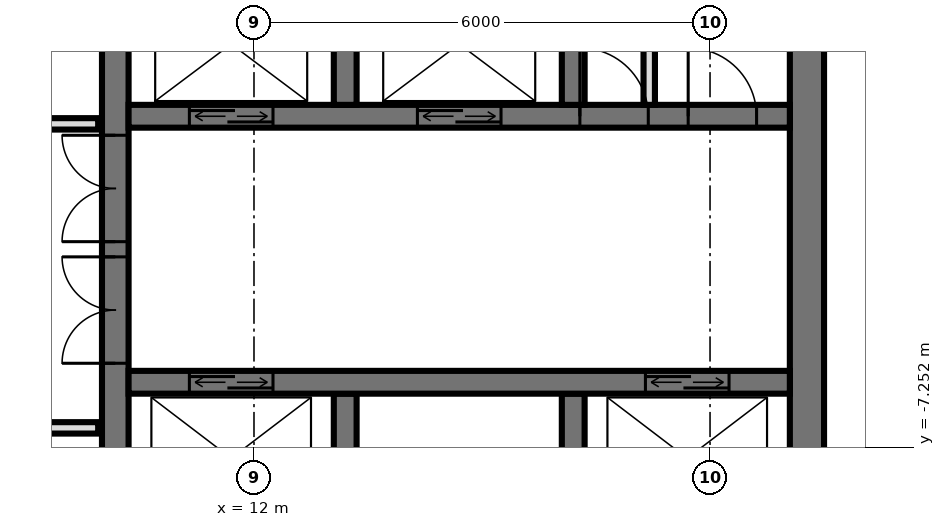
"""IFC4 building model, lengths in metres.
Left out: names, types, materials, properties, quantities, classifications, styles, units other than length and angle.
Written with IfcOpenShell. Run it as: python <this file> out.ifc"""

import sys

from ifc_helpers import new_model, si_unit, direction, frame, frame_2d, origin, place, context, subcontext, project, spatial, rectangle, extrude, element, fill, save


model = new_model("IFC4")
c1 = context("Model", 3, precision=1e-05, world=origin(), true_north=direction((0.0, 1.0)))
c2 = subcontext(c1, "Body", "Model", "MODEL_VIEW")
j1 = project(units=[si_unit("LENGTHUNIT", "METRE"), si_unit("PLANEANGLEUNIT", "RADIAN")], contexts=[c1])
p1 = place(None, origin())
s1 = spatial("IfcSite", under=j1, at=p1, CompositionType="ELEMENT")
p2 = place(p1, origin())
s2 = spatial("IfcBuilding", under=s1, at=p2, CompositionType="ELEMENT")
p3 = place(p2, frame((0.0, 0.0, 342.6)))
s3 = spatial("IfcBuildingStorey", under=s2, at=p3, CompositionType="ELEMENT", Elevation=342.6)
p4 = place(p3, frame((10.175, -14.55, 0.0), z_axis=(0.0, 0.0, 1.0), x_axis=(0.0, 1.0, 0.0)))
e1 = element("IfcWall", 1, at=p4, inside=s3, PredefinedType="SHEAR", context=c2, shape_type="SweptSolid", body=[
    extrude(rectangle(XDim=14.1, YDim=0.35, at=frame_2d((7.05, 0.0))), origin(), (0.0, 0.0, 1.0), 4.0),
])
p5 = place(p4, frame((8.4, 0.0, 0.0)))
e2 = element("IfcOpeningElement", 2, at=p5, cuts=e1, PredefinedType="OPENING", context=c2, shape_type="SweptSolid", body=[
    extrude(rectangle(XDim=1.4, YDim=2.4, at=frame_2d((0.7, 1.2))), frame((0.0, 0.185, 0.0), z_axis=(0.0, -1.0, 0.0), x_axis=(1.0, 0.0, 0.0)), (0.0, 0.0, 1.0), 0.37),
])
p6 = place(p4, frame((10.0, 0.0, 0.0)))
e3 = element("IfcOpeningElement", 3, at=p6, cuts=e1, PredefinedType="OPENING", context=c2, shape_type="SweptSolid", body=[
    extrude(rectangle(XDim=1.4, YDim=2.4, at=frame_2d((0.7, 1.2))), frame((0.0, 0.185, 0.0), z_axis=(0.0, -1.0, 0.0), x_axis=(1.0, 0.0, 0.0)), (0.0, 0.0, 1.0), 0.37),
])
p7 = place(p4, frame((4.0, 0.0, 0.0)))
e4 = element("IfcOpeningElement", 4, at=p7, cuts=e1, PredefinedType="OPENING", context=c2, shape_type="SweptSolid", body=[
    extrude(rectangle(XDim=1.2, YDim=2.1, at=frame_2d((0.6, 1.05))), frame((0.0, 0.185, 0.0), z_axis=(0.0, -1.0, 0.0), x_axis=(1.0, 0.0, 0.0)), (0.0, 0.0, 1.0), 0.37),
])
p8 = place(p3, frame((19.275, -14.55, 0.0), z_axis=(0.0, 0.0, 1.0), x_axis=(0.0, 1.0, 0.0)))
e5 = element("IfcWall", 5, at=p8, inside=s3, PredefinedType="SHEAR", context=c2, shape_type="SweptSolid", body=[
    extrude(rectangle(XDim=14.1, YDim=0.45, at=frame_2d((7.05, 0.0))), origin(), (0.0, 0.0, 1.0), 4.0),
])
p9 = place(p3, frame((10.35, -2.9, 0.0), z_axis=(0.0, 0.0, 1.0), x_axis=(1.0, 0.0, 0.0)))
e6 = element("IfcWall", 6, at=p9, inside=s3, PredefinedType="SHEAR", context=c2, shape_type="SweptSolid", body=[
    extrude(rectangle(XDim=8.7, YDim=0.3, at=frame_2d((4.35, 0.0))), origin(), (0.0, 0.0, 1.0), 4.0),
])
p10 = place(p9, frame((0.8, 0.0, 0.0)))
e7 = element("IfcOpeningElement", 7, at=p10, cuts=e6, PredefinedType="OPENING", context=c2, shape_type="SweptSolid", body=[
    extrude(rectangle(XDim=1.1, YDim=2.1, at=frame_2d((0.55, 1.05))), frame((0.0, 0.16, 0.0), z_axis=(0.0, -1.0, 0.0), x_axis=(1.0, 0.0, 0.0)), (0.0, 0.0, 1.0), 0.32),
])
p11 = place(p9, frame((3.8, 0.0, 0.0)))
e8 = element("IfcOpeningElement", 8, at=p11, cuts=e6, PredefinedType="OPENING", context=c2, shape_type="SweptSolid", body=[
    extrude(rectangle(XDim=1.1, YDim=2.1, at=frame_2d((0.55, 1.05))), frame((0.0, 0.16, 0.0), z_axis=(0.0, -1.0, 0.0), x_axis=(1.0, 0.0, 0.0)), (0.0, 0.0, 1.0), 0.32),
])
p12 = place(p9, frame((5.938, 0.0, 0.0)))
e9 = element("IfcOpeningElement", 9, at=p12, cuts=e6, PredefinedType="OPENING", context=c2, shape_type="SweptSolid", body=[
    extrude(rectangle(XDim=0.9, YDim=2.1, at=frame_2d((0.45, 1.05))), frame((0.0, 0.16, 0.0), z_axis=(0.0, -1.0, 0.0), x_axis=(1.0, 0.0, 0.0)), (0.0, 0.0, 1.0), 0.32),
])
p13 = place(p9, frame((7.363, 0.0, 0.0)))
e10 = element("IfcOpeningElement", 10, at=p13, cuts=e6, PredefinedType="OPENING", context=c2, shape_type="SweptSolid", body=[
    extrude(rectangle(XDim=0.9, YDim=2.1, at=frame_2d((0.45, 1.05))), frame((0.0, 0.16, 0.0), z_axis=(0.0, -1.0, 0.0), x_axis=(1.0, 0.0, 0.0)), (0.0, 0.0, 1.0), 0.32),
])
p14 = place(p3, frame((10.35, -6.4, 0.0), z_axis=(0.0, 0.0, 1.0), x_axis=(1.0, 0.0, 0.0)))
e11 = element("IfcWall", 11, at=p14, inside=s3, PredefinedType="SHEAR", context=c2, shape_type="SweptSolid", body=[
    extrude(rectangle(XDim=8.7, YDim=0.3, at=frame_2d((4.35, 0.0))), origin(), (0.0, 0.0, 1.0), 4.0),
])
p15 = place(p14, frame((0.8, 0.0, 0.0)))
e12 = element("IfcOpeningElement", 12, at=p15, cuts=e11, PredefinedType="OPENING", context=c2, shape_type="SweptSolid", body=[
    extrude(rectangle(XDim=1.1, YDim=2.1, at=frame_2d((0.55, 1.05))), frame((0.0, 0.16, 0.0), z_axis=(0.0, -1.0, 0.0), x_axis=(1.0, 0.0, 0.0)), (0.0, 0.0, 1.0), 0.32),
])
p16 = place(p14, frame((6.8, 0.0, 0.0)))
e13 = element("IfcOpeningElement", 13, at=p16, cuts=e11, PredefinedType="OPENING", context=c2, shape_type="SweptSolid", body=[
    extrude(rectangle(XDim=1.1, YDim=2.1, at=frame_2d((0.55, 1.05))), frame((0.0, 0.16, 0.0), z_axis=(0.0, -1.0, 0.0), x_axis=(1.0, 0.0, 0.0)), (0.0, 0.0, 1.0), 0.32),
])
for number, where, z_axis, x_axis in (
    (14, (13.2, -2.75, 0.0), (0.0, 0.0, 1.0), (0.0, 1.0, 0.0)),
    (15, (13.2, -8.85, 0.0), (0.0, 0.0, 1.0), (0.0, 1.0, 0.0)),
    (16, (16.2, -2.75, 0.0), (0.0, 0.0, 1.0), (0.0, 1.0, 0.0)),
    (17, (16.2, -8.85, 0.0), (0.0, 0.0, 1.0), (0.0, 1.0, 0.0)),
):
    element("IfcWall", number, at=place(p3, frame(where, z_axis=z_axis, x_axis=x_axis)), inside=s3, PredefinedType="SHEAR", context=c2, shape_type="SweptSolid", body=[
        extrude(rectangle(XDim=2.3, YDim=0.3, at=frame_2d((1.15, 0.0))), origin(), (0.0, 0.0, 1.0), 4.0),
    ])
p17 = place(p3, frame((17.2, -2.75, 0.0), z_axis=(0.0, 0.0, 1.0), x_axis=(0.0, 1.0, 0.0)))
e18 = element("IfcWall", 18, at=p17, inside=s3, PredefinedType="PARTITIONING", context=c2, shape_type="SweptSolid", body=[
    extrude(rectangle(XDim=2.3, YDim=0.15, at=frame_2d((1.15, 0.0))), origin(), (0.0, 0.0, 1.0), 3.7),
])
p18 = place(p3, frame((-9.95, -7.0, 0.0), z_axis=(0.0, 0.0, 1.0), x_axis=(1.0, 0.0, 0.0)))
e19 = element("IfcWall", 19, at=p18, inside=s3, PredefinedType="PARTITIONING", context=c2, shape_type="SweptSolid", body=[
    extrude(rectangle(XDim=19.9, YDim=0.15, at=frame_2d((9.95, 0.0))), origin(), (0.0, 0.0, 1.0), 3.72),
])
p19 = place(p18, frame((9.45, 0.0, 0.0)))
e20 = element("IfcOpeningElement", 20, at=p19, cuts=e19, PredefinedType="OPENING", context=c2, shape_type="SweptSolid", body=[
    extrude(rectangle(XDim=1.0, YDim=2.1, at=frame_2d((0.5, 1.05))), frame((0.0, 0.085, 0.0), z_axis=(0.0, -1.0, 0.0), x_axis=(1.0, 0.0, 0.0)), (0.0, 0.0, 1.0), 0.17),
])
p20 = place(p18, frame((3.45, 0.0, 0.0)))
e21 = element("IfcOpeningElement", 21, at=p20, cuts=e19, PredefinedType="OPENING", context=c2, shape_type="SweptSolid", body=[
    extrude(rectangle(XDim=1.0, YDim=2.1, at=frame_2d((0.5, 1.05))), frame((0.0, 0.085, 0.0), z_axis=(0.0, -1.0, 0.0), x_axis=(1.0, 0.0, 0.0)), (0.0, 0.0, 1.0), 0.17),
])
p21 = place(p3, frame((-9.95, -3.0, 0.0), z_axis=(0.0, 0.0, 1.0), x_axis=(1.0, 0.0, 0.0)))
e22 = element("IfcWall", 22, at=p21, inside=s3, PredefinedType="PARTITIONING", context=c2, shape_type="SweptSolid", body=[
    extrude(rectangle(XDim=19.9, YDim=0.15, at=frame_2d((9.95, 0.0))), origin(), (0.0, 0.0, 1.0), 3.72),
])
p22 = place(p21, frame((0.95, 0.0, 0.0)))
e23 = element("IfcOpeningElement", 23, at=p22, cuts=e22, PredefinedType="OPENING", context=c2, shape_type="SweptSolid", body=[
    extrude(rectangle(XDim=1.0, YDim=2.1, at=frame_2d((0.5, 1.05))), frame((0.0, 0.085, 0.0), z_axis=(0.0, -1.0, 0.0), x_axis=(1.0, 0.0, 0.0)), (0.0, 0.0, 1.0), 0.17),
])
p23 = place(p21, frame((3.7, 0.0, 0.0)))
e24 = element("IfcOpeningElement", 24, at=p23, cuts=e22, PredefinedType="OPENING", context=c2, shape_type="SweptSolid", body=[
    extrude(rectangle(XDim=1.0, YDim=2.1, at=frame_2d((0.5, 1.05))), frame((0.0, 0.085, 0.0), z_axis=(0.0, -1.0, 0.0), x_axis=(1.0, 0.0, 0.0)), (0.0, 0.0, 1.0), 0.17),
])
p24 = place(p21, frame((8.95, 0.0, 0.0)))
e25 = element("IfcOpeningElement", 25, at=p24, cuts=e22, PredefinedType="OPENING", context=c2, shape_type="SweptSolid", body=[
    extrude(rectangle(XDim=1.0, YDim=2.1, at=frame_2d((0.5, 1.05))), frame((0.0, 0.085, 0.0), z_axis=(0.0, -1.0, 0.0), x_axis=(1.0, 0.0, 0.0)), (0.0, 0.0, 1.0), 0.17),
])
p25 = place(p21, frame((16.2, 0.0, 0.0)))
e26 = element("IfcOpeningElement", 26, at=p25, cuts=e22, PredefinedType="OPENING", context=c2, shape_type="SweptSolid", body=[
    extrude(rectangle(XDim=1.0, YDim=2.1, at=frame_2d((0.5, 1.05))), frame((0.0, 0.085, 0.0), z_axis=(0.0, -1.0, 0.0), x_axis=(1.0, 0.0, 0.0)), (0.0, 0.0, 1.0), 0.17),
])
p26 = place(p10, origin())
e27 = element("IfcDoor", 27, at=p26, inside=s3, OperationType="DOUBLE_DOOR_SLIDING", PredefinedType="USERDEFINED", context=c2, shape_type="SweptSolid", body=[
    extrude(rectangle(XDim=1.1, YDim=2.1, at=frame_2d((0.55, 1.05))), frame((0.0, 0.025, 0.0), z_axis=(0.0, -1.0, 0.0), x_axis=(1.0, 0.0, 0.0)), (0.0, 0.0, 1.0), 0.05),
])
fill(e7, e27)
p27 = place(p11, origin())
e28 = element("IfcDoor", 28, at=p27, inside=s3, OperationType="DOUBLE_DOOR_SLIDING", PredefinedType="USERDEFINED", context=c2, shape_type="SweptSolid", body=[
    extrude(rectangle(XDim=1.1, YDim=2.1, at=frame_2d((0.55, 1.05))), frame((0.0, 0.025, 0.0), z_axis=(0.0, -1.0, 0.0), x_axis=(1.0, 0.0, 0.0)), (0.0, 0.0, 1.0), 0.05),
])
fill(e8, e28)
p28 = place(p15, origin())
e29 = element("IfcDoor", 29, at=p28, inside=s3, OperationType="DOUBLE_DOOR_SLIDING", PredefinedType="USERDEFINED", context=c2, shape_type="SweptSolid", body=[
    extrude(rectangle(XDim=1.1, YDim=2.1, at=frame_2d((0.55, 1.05))), frame((0.0, 0.025, 0.0), z_axis=(0.0, -1.0, 0.0), x_axis=(1.0, 0.0, 0.0)), (0.0, 0.0, 1.0), 0.05),
])
fill(e12, e29)
p29 = place(p16, origin())
e30 = element("IfcDoor", 30, at=p29, inside=s3, OperationType="DOUBLE_DOOR_SLIDING", PredefinedType="USERDEFINED", context=c2, shape_type="SweptSolid", body=[
    extrude(rectangle(XDim=1.1, YDim=2.1, at=frame_2d((0.55, 1.05))), frame((0.0, 0.025, 0.0), z_axis=(0.0, -1.0, 0.0), x_axis=(1.0, 0.0, 0.0)), (0.0, 0.0, 1.0), 0.05),
])
fill(e13, e30)
p30 = place(p5, origin())
e31 = element("IfcDoor", 31, at=p30, inside=s3, OperationType="DOUBLE_DOOR_SINGLE_SWING", PredefinedType="DOOR", context=c2, shape_type="SweptSolid", body=[
    extrude(rectangle(XDim=1.4, YDim=2.4, at=frame_2d((0.7, 1.2))), frame((0.0, 0.025, 0.0), z_axis=(0.0, -1.0, 0.0), x_axis=(1.0, 0.0, 0.0)), (0.0, 0.0, 1.0), 0.05),
])
fill(e2, e31)
p31 = place(p6, origin())
e32 = element("IfcDoor", 32, at=p31, inside=s3, OperationType="DOUBLE_DOOR_SINGLE_SWING", PredefinedType="DOOR", context=c2, shape_type="SweptSolid", body=[
    extrude(rectangle(XDim=1.4, YDim=2.4, at=frame_2d((0.7, 1.2))), frame((0.0, 0.025, 0.0), z_axis=(0.0, -1.0, 0.0), x_axis=(1.0, 0.0, 0.0)), (0.0, 0.0, 1.0), 0.05),
])
fill(e3, e32)
p32 = place(p12, origin())
e33 = element("IfcDoor", 33, at=p32, inside=s3, OperationType="SINGLE_SWING_RIGHT", PredefinedType="DOOR", context=c2, shape_type="SweptSolid", body=[
    extrude(rectangle(XDim=0.9, YDim=2.1, at=frame_2d((0.45, 1.05))), frame((0.0, 0.025, 0.0), z_axis=(0.0, -1.0, 0.0), x_axis=(1.0, 0.0, 0.0)), (0.0, 0.0, 1.0), 0.05),
])
fill(e9, e33)
p33 = place(p13, origin())
e34 = element("IfcDoor", 34, at=p33, inside=s3, OperationType="SINGLE_SWING_RIGHT", PredefinedType="DOOR", context=c2, shape_type="SweptSolid", body=[
    extrude(rectangle(XDim=0.9, YDim=2.1, at=frame_2d((0.45, 1.05))), frame((0.0, 0.025, 0.0), z_axis=(0.0, -1.0, 0.0), x_axis=(1.0, 0.0, 0.0)), (0.0, 0.0, 1.0), 0.05),
])
fill(e10, e34)
save(model, sys.argv[1])
